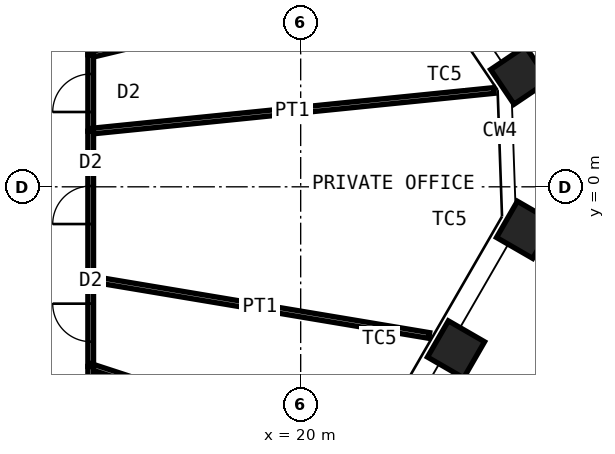
"""IFC4 building model, lengths in metres.
Left out: names, types, materials, properties, quantities, classifications, styles, units other than length and angle.
Written with IfcOpenShell. Run it as: python <this file> out.ifc"""

import sys

from ifc_helpers import new_model, si_unit, direction, frame, frame_2d, origin, origin_2d, place, context, subcontext, project, spatial, rectangle, hollow_rectangle, extrude, element, fill, save


model = new_model("IFC4")
c1 = context("Model", 3, precision=1e-05, world=origin(), true_north=direction((0.0, 1.0)))
c2 = subcontext(c1, "Body", "Model", "MODEL_VIEW")
j1 = project(units=[si_unit("LENGTHUNIT", "METRE"), si_unit("PLANEANGLEUNIT", "RADIAN")], contexts=[c1])
p1 = place(None, origin())
s1 = spatial("IfcSite", under=j1, at=p1, CompositionType="ELEMENT")
p2 = place(p1, origin())
s2 = spatial("IfcBuilding", under=s1, at=p2, CompositionType="ELEMENT")
p3 = place(p2, frame((0.0, 0.0, 209.8)))
s3 = spatial("IfcBuildingStorey", under=s2, at=p3, CompositionType="ELEMENT", Elevation=209.8)
for number, where, z_axis, x_axis in (
    (1, (25.762, 2.936, 0.0), (0.0, 0.0, 1.0), (-0.559, 0.829, 0.0)),
    (2, (25.905, -1.132, 0.0), (0.0, 0.0, 1.0), (0.5, 0.866, 0.0)),
    (3, (24.088, -4.279, 0.0), (0.0, 0.0, 1.0), (0.5, 0.866, 0.0)),
):
    element("IfcColumn", number, at=place(p3, frame(where, z_axis=z_axis, x_axis=x_axis)), inside=s3, PredefinedType="COLUMN", context=c2, shape_type="SweptSolid", body=[
        extrude(hollow_rectangle(XDim=1.1, YDim=1.1, WallThickness=0.07, at=origin_2d()), origin(), (0.0, 0.0, 1.0), 4.2),
    ])
p4 = place(p3, frame((14.475, 5.874, 0.0), z_axis=(0.0, 0.0, 1.0), x_axis=(0.0, -1.0, 0.0)))
e4 = element("IfcWall", 4, at=p4, inside=s3, PredefinedType="PARTITIONING", context=c2, shape_type="SweptSolid", body=[
    extrude(rectangle(XDim=2.399, YDim=0.15, at=frame_2d((1.2, 0.0))), origin(), (0.0, 0.0, 1.0), 4.03),
])
p5 = place(p4, frame((0.699, 0.0, 0.0)))
e5 = element("IfcOpeningElement", 5, at=p5, cuts=e4, PredefinedType="OPENING", context=c2, shape_type="SweptSolid", body=[
    extrude(rectangle(XDim=1.0, YDim=2.4, at=frame_2d((0.5, 1.2))), frame((0.0, 0.085, 0.0), z_axis=(0.0, -1.0, 0.0), x_axis=(1.0, 0.0, 0.0)), (0.0, 0.0, 1.0), 0.17),
])
p6 = place(p3, frame((23.053, 5.534, 0.0), z_axis=(0.0, 0.0, 1.0), x_axis=(-0.972377252501, -0.233414821335, 0.0)))
e6 = element("IfcWall", 6, at=p6, inside=s3, PredefinedType="PARTITIONING", context=c2, shape_type="SweptSolid", body=[
    extrude(rectangle(XDim=8.822, YDim=0.15, at=frame_2d((4.411, 0.0))), origin(), (0.0, 0.0, 1.0), 3.43),
])
p7 = place(p3, frame((14.475, 3.475, 0.0), z_axis=(0.0, 0.0, 1.0), x_axis=(0.0, -1.0, 0.0)))
e7 = element("IfcWall", 7, at=p7, inside=s3, PredefinedType="PARTITIONING", context=c2, shape_type="SweptSolid", body=[
    extrude(rectangle(XDim=2.012, YDim=0.15, at=frame_2d((1.006, 0.0))), origin(), (0.0, 0.0, 1.0), 4.03),
])
p8 = place(p7, frame((0.506, 0.0, 0.0)))
e8 = element("IfcOpeningElement", 8, at=p8, cuts=e7, PredefinedType="OPENING", context=c2, shape_type="SweptSolid", body=[
    extrude(rectangle(XDim=1.0, YDim=2.4, at=frame_2d((0.5, 1.2))), frame((0.0, 0.085, 0.0), z_axis=(0.0, -1.0, 0.0), x_axis=(1.0, 0.0, 0.0)), (0.0, 0.0, 1.0), 0.17),
])
p9 = place(p3, frame((25.083, 2.535, 0.0), z_axis=(0.0, 0.0, 1.0), x_axis=(-0.994932122767, -0.10054884925, 0.0)))
e9 = element("IfcWall", 9, at=p9, inside=s3, PredefinedType="PARTITIONING", context=c2, shape_type="SweptSolid", body=[
    extrude(rectangle(XDim=10.662, YDim=0.15, at=frame_2d((5.331, 0.0))), origin(), (0.0, 0.0, 1.0), 2.93),
])
p10 = place(p3, frame((14.475, 1.463, 0.0), z_axis=(0.0, 0.0, 1.0), x_axis=(0.0, -1.0, 0.0)))
e10 = element("IfcWall", 10, at=p10, inside=s3, PredefinedType="PARTITIONING", context=c2, shape_type="SweptSolid", body=[
    extrude(rectangle(XDim=3.885, YDim=0.15, at=frame_2d((1.942, 0.0))), origin(), (0.0, 0.0, 1.0), 4.03),
])
p11 = place(p10, frame((1.442, 0.0, 0.0)))
e11 = element("IfcOpeningElement", 11, at=p11, cuts=e10, PredefinedType="OPENING", context=c2, shape_type="SweptSolid", body=[
    extrude(rectangle(XDim=1.0, YDim=2.4, at=frame_2d((0.5, 1.2))), frame((0.0, 0.085, 0.0), z_axis=(0.0, -1.0, 0.0), x_axis=(1.0, 0.0, 0.0)), (0.0, 0.0, 1.0), 0.17),
])
p12 = place(p3, frame((23.383, -3.912, 0.0), z_axis=(0.0, 0.0, 1.0), x_axis=(-0.986293651891, 0.164999491631, 0.0)))
e12 = element("IfcWall", 12, at=p12, inside=s3, PredefinedType="PARTITIONING", context=c2, shape_type="SweptSolid", body=[
    extrude(rectangle(XDim=9.032, YDim=0.15, at=frame_2d((4.516, 0.0))), origin(), (0.0, 0.0, 1.0), 3.43),
])
p13 = place(p3, frame((14.475, -2.422, 0.0), z_axis=(0.0, 0.0, 1.0), x_axis=(0.0, -1.0, 0.0)))
e13 = element("IfcWall", 13, at=p13, inside=s3, PredefinedType="PARTITIONING", context=c2, shape_type="SweptSolid", body=[
    extrude(rectangle(XDim=2.305, YDim=0.15, at=frame_2d((1.153, 0.0))), origin(), (0.0, 0.0, 1.0), 4.03),
])
p14 = place(p13, frame((0.653, 0.0, 0.0)))
e14 = element("IfcOpeningElement", 14, at=p14, cuts=e13, PredefinedType="OPENING", context=c2, shape_type="SweptSolid", body=[
    extrude(rectangle(XDim=1.0, YDim=2.4, at=frame_2d((0.5, 1.2))), frame((0.0, 0.085, 0.0), z_axis=(0.0, -1.0, 0.0), x_axis=(1.0, 0.0, 0.0)), (0.0, 0.0, 1.0), 0.17),
])
p15 = place(p3, frame((21.57, -7.044, 0.0), z_axis=(0.0, 0.0, 1.0), x_axis=(-0.950585953502, 0.310461503258, 0.0)))
e15 = element("IfcWall", 15, at=p15, inside=s3, PredefinedType="PARTITIONING", context=c2, shape_type="SweptSolid", body=[
    extrude(rectangle(XDim=7.464, YDim=0.15, at=frame_2d((3.732, 0.0))), origin(), (0.0, 0.0, 1.0), 3.43),
])
p16 = place(p3, frame((14.475, -4.727, 0.0), z_axis=(0.0, 0.0, 1.0), x_axis=(0.0, -1.0, 0.0)))
e16 = element("IfcWall", 16, at=p16, inside=s3, PredefinedType="PARTITIONING", context=c2, shape_type="SweptSolid", body=[
    extrude(rectangle(XDim=6.748, YDim=0.15, at=frame_2d((3.374, 0.0))), origin(), (0.0, 0.0, 1.0), 4.03),
])
p17 = place(p16, frame((2.474, 0.0, 0.0)))
e17 = element("IfcOpeningElement", 17, at=p17, cuts=e16, PredefinedType="OPENING", context=c2, shape_type="SweptSolid", body=[
    extrude(rectangle(XDim=1.8, YDim=2.4, at=frame_2d((0.9, 1.2))), frame((0.0, 0.085, 0.0), z_axis=(0.0, -1.0, 0.0), x_axis=(1.0, 0.0, 0.0)), (0.0, 0.0, 1.0), 0.17),
])
p18 = place(p8, origin())
e18 = element("IfcDoor", 18, at=p18, inside=s3, OperationType="SINGLE_SWING_RIGHT", PredefinedType="DOOR", context=c2, shape_type="SweptSolid", body=[
    extrude(rectangle(XDim=1.0, YDim=2.4, at=frame_2d((0.5, 1.2))), frame((0.0, 0.025, 0.0), z_axis=(0.0, -1.0, 0.0), x_axis=(1.0, 0.0, 0.0)), (0.0, 0.0, 1.0), 0.05),
])
fill(e8, e18)
p19 = place(p11, origin())
e19 = element("IfcDoor", 19, at=p19, inside=s3, OperationType="SINGLE_SWING_RIGHT", PredefinedType="DOOR", context=c2, shape_type="SweptSolid", body=[
    extrude(rectangle(XDim=1.0, YDim=2.4, at=frame_2d((0.5, 1.2))), frame((0.0, 0.025, 0.0), z_axis=(0.0, -1.0, 0.0), x_axis=(1.0, 0.0, 0.0)), (0.0, 0.0, 1.0), 0.05),
])
fill(e11, e19)
p20 = place(p14, origin())
e20 = element("IfcDoor", 20, at=p20, inside=s3, OperationType="SINGLE_SWING_LEFT", PredefinedType="DOOR", context=c2, shape_type="SweptSolid", body=[
    extrude(rectangle(XDim=1.0, YDim=2.4, at=frame_2d((0.5, 1.2))), frame((0.0, 0.025, 0.0), z_axis=(0.0, -1.0, 0.0), x_axis=(1.0, 0.0, 0.0)), (0.0, 0.0, 1.0), 0.05),
])
fill(e14, e20)
save(model, sys.argv[1])
